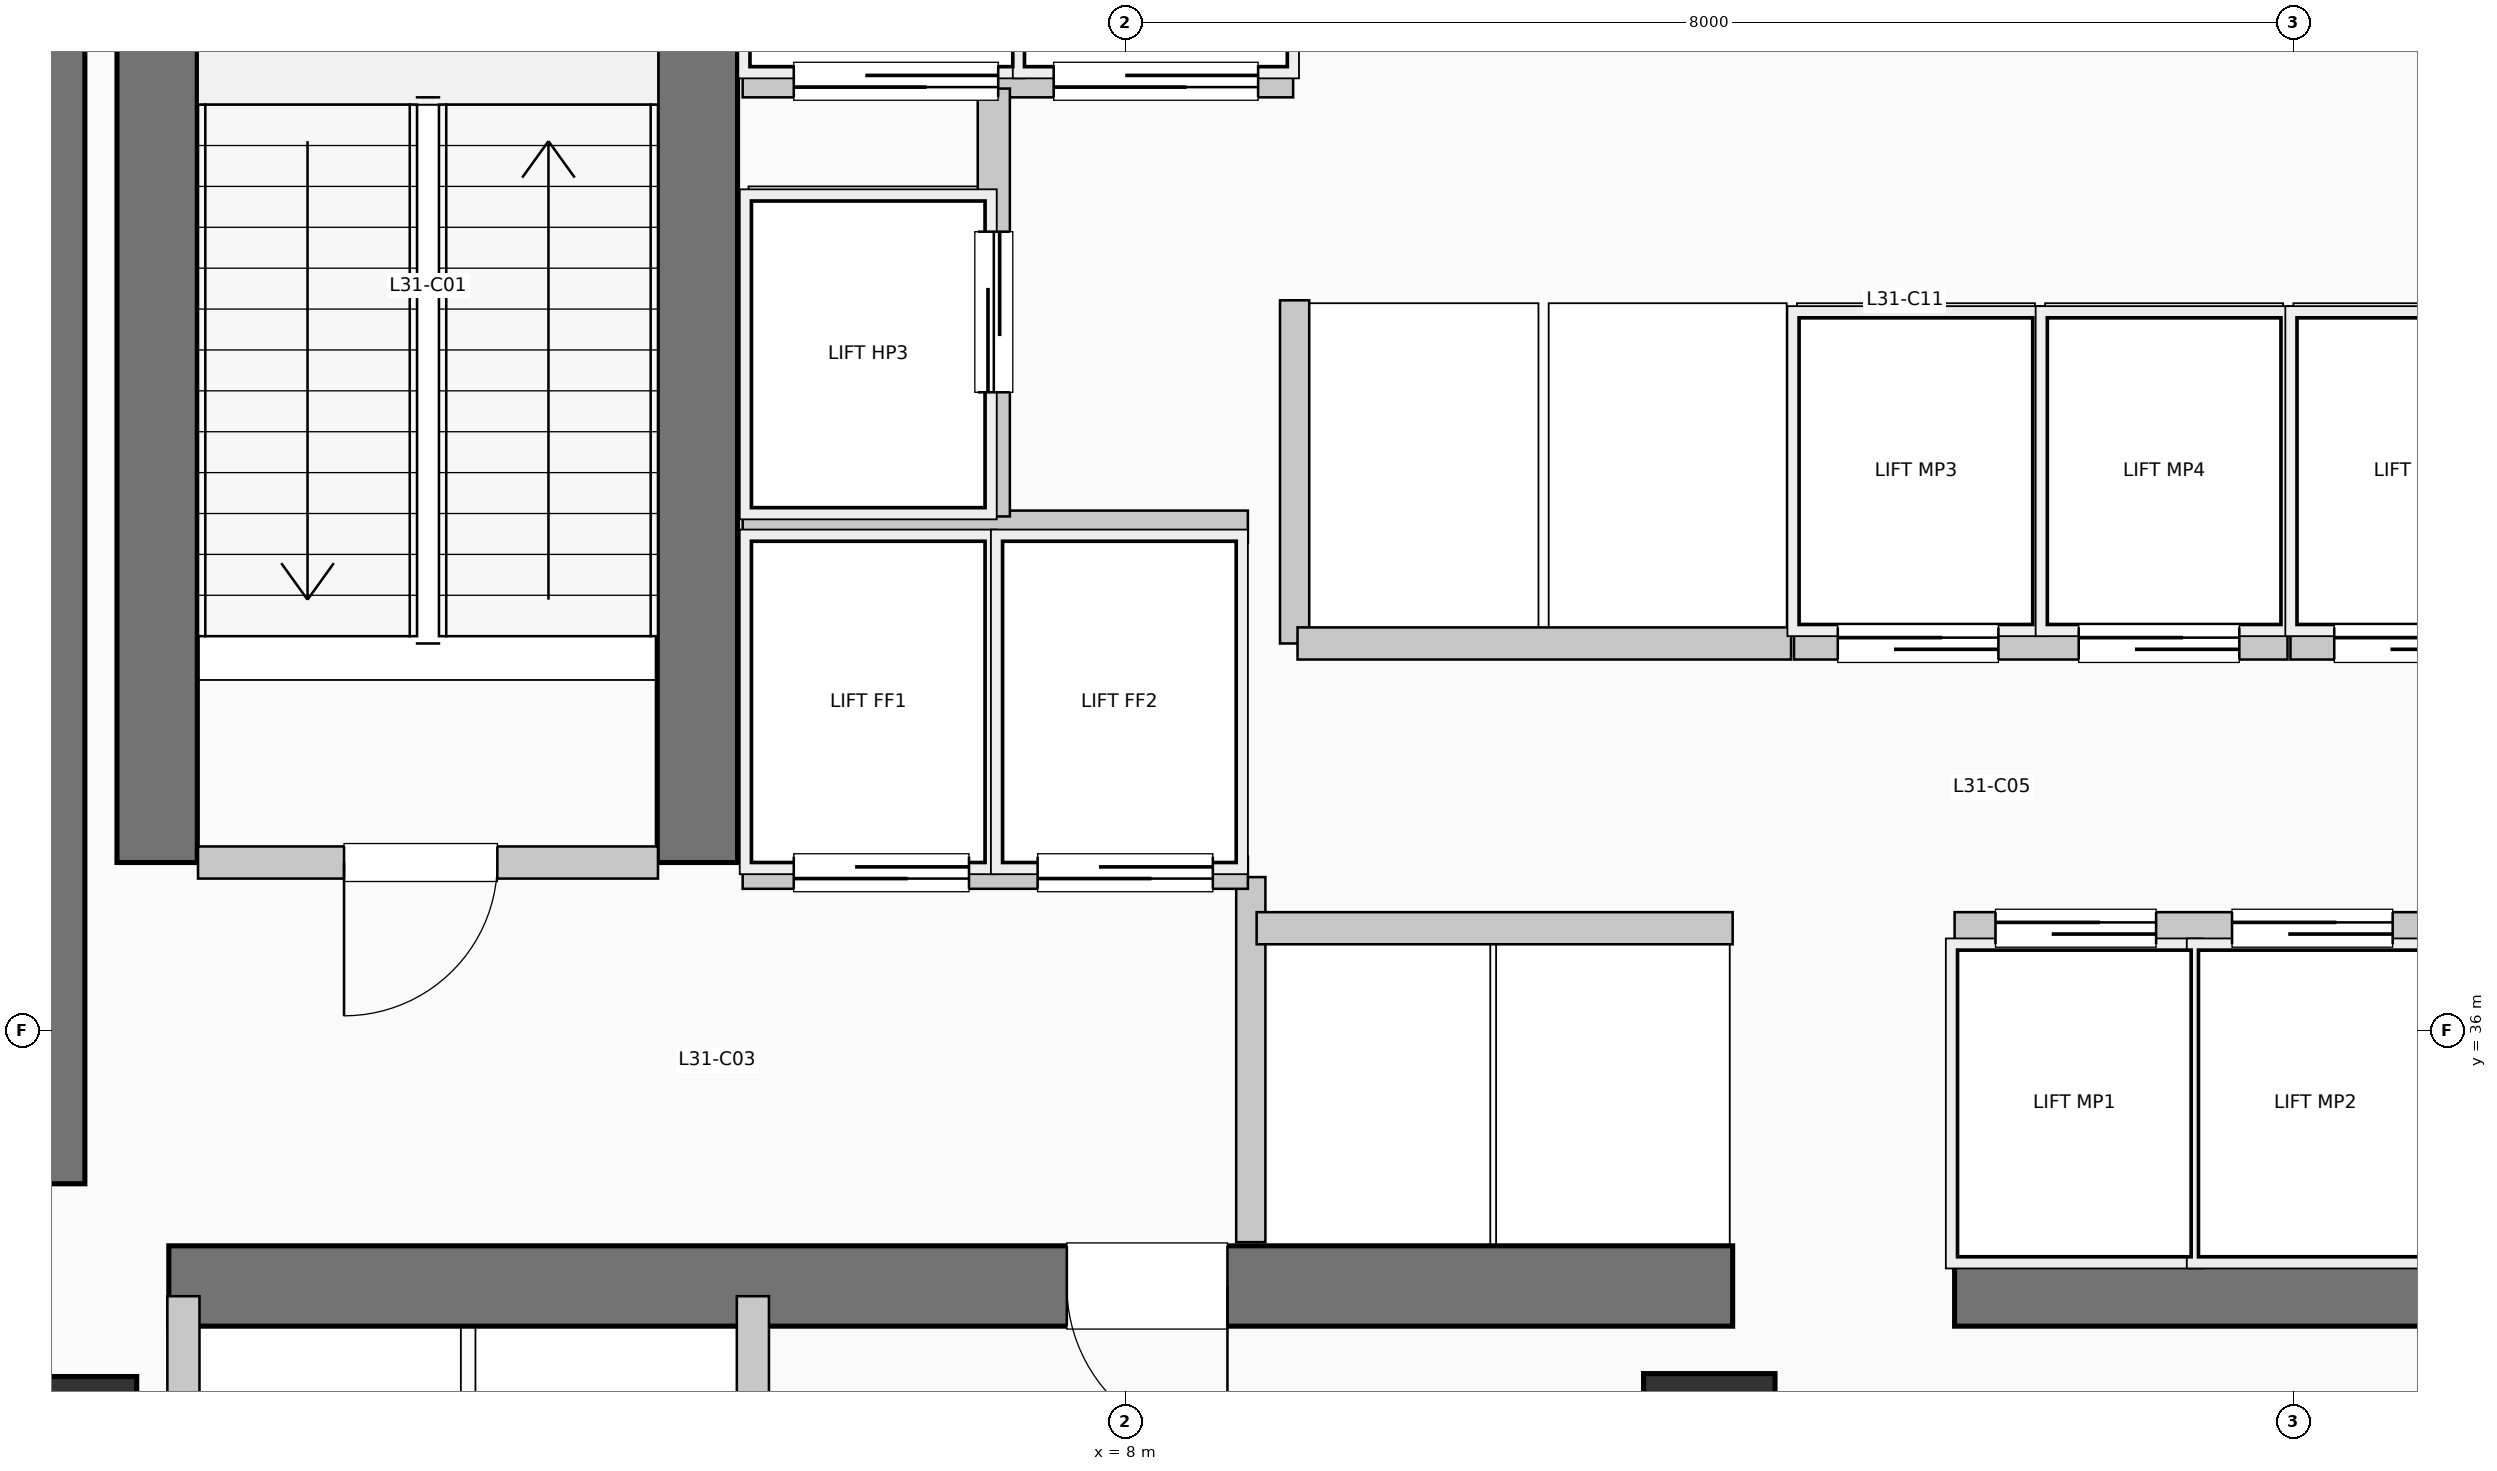
"""IFC4 building model, lengths in metres.
Left out: names, types, materials, properties, quantities, classifications, styles, units other than length and angle.
Written with IfcOpenShell. Run it as: python <this file> out.ifc"""

import sys

from ifc_helpers import new_model, si_unit, direction, frame, frame_2d, origin, origin_2d, place, context, subcontext, project, spatial, rectangle, extrude, element, fill, save


model = new_model("IFC4")
c1 = context("Model", 3, precision=1e-05, world=origin(), true_north=direction((0.0, 1.0)))
c2 = subcontext(c1, "Body", "Model", "MODEL_VIEW")
j1 = project(units=[si_unit("LENGTHUNIT", "METRE"), si_unit("PLANEANGLEUNIT", "RADIAN")], contexts=[c1])
p1 = place(None, origin())
s1 = spatial("IfcSite", under=j1, at=p1, CompositionType="ELEMENT")
p2 = place(p1, origin())
s2 = spatial("IfcBuilding", under=s1, at=p2, CompositionType="ELEMENT")
p3 = place(p2, frame((0.0, 0.0, 130.35)))
s3 = spatial("IfcBuildingStorey", under=s2, at=p3, CompositionType="ELEMENT", Elevation=130.35)
p4 = place(p3, frame((0.5, 34.95, 0.0), z_axis=(0.0, 0.0, 1.0), x_axis=(0.0, 1.0, 0.0)))
e1 = element("IfcWall", 1, at=p4, inside=s3, PredefinedType="SHEAR", context=c2, shape_type="SweptSolid", body=[
    extrude(rectangle(XDim=7.9, YDim=0.75, at=frame_2d((3.95, 0.0))), origin(), (0.0, 0.0, 1.0), 4.62),
])
p5 = place(p3, frame((1.45, 34.25, 0.0), z_axis=(0.0, 0.0, 1.0), x_axis=(1.0, 0.0, 0.0)))
e2 = element("IfcWall", 2, at=p5, inside=s3, PredefinedType="SHEAR", context=c2, shape_type="SweptSolid", body=[
    extrude(rectangle(XDim=10.71, YDim=0.55, at=frame_2d((5.355, 0.0))), origin(), (0.0, 0.0, 1.0), 4.62),
])
p6 = place(p5, frame((7.25, 0.0, 0.0), z_axis=(0.0, 0.0, 1.0), x_axis=(-1.0, 0.0, 0.0)))
e3 = element("IfcOpeningElement", 3, at=p6, cuts=e2, PredefinedType="OPENING", context=c2, shape_type="SweptSolid", body=[
    extrude(rectangle(XDim=1.1, YDim=2.15, at=frame_2d((0.55, 1.075))), frame((0.0, 0.285, 0.0), z_axis=(0.0, -1.0, 0.0), x_axis=(1.0, 0.0, 0.0)), (0.0, 0.0, 1.0), 0.57),
])
p7 = place(p3, frame((13.68, 34.25, 0.0), z_axis=(0.0, 0.0, 1.0), x_axis=(1.0, 0.0, 0.0)))
e4 = element("IfcWall", 4, at=p7, inside=s3, PredefinedType="SHEAR", context=c2, shape_type="SweptSolid", body=[
    extrude(rectangle(XDim=6.12, YDim=0.55, at=frame_2d((3.06, 0.0))), origin(), (0.0, 0.0, 1.0), 4.62),
])
for number, where, z_axis, x_axis in (
    (5, (1.37, 37.15, 0.0), (0.0, 0.0, 1.0), (0.0, 1.0, 0.0)),
    (6, (5.07, 37.15, 0.0), (0.0, 0.0, 1.0), (0.0, 1.0, 0.0)),
):
    element("IfcWall", number, at=place(p3, frame(where, z_axis=z_axis, x_axis=x_axis)), inside=s3, PredefinedType="SHEAR", context=c2, shape_type="SweptSolid", body=[
        extrude(rectangle(XDim=7.89, YDim=0.55, at=frame_2d((3.945, 0.0))), origin(), (0.0, 0.0, 1.0), 4.62),
    ])
p8 = place(p3, frame((0.8, 33.2, 0.0), z_axis=(0.0, 0.0, 1.0), x_axis=(1.0, 0.0, 0.0)))
e7 = element("IfcColumn", 7, at=p8, inside=s3, PredefinedType="COLUMN", context=c2, shape_type="SweptSolid", body=[
    extrude(rectangle(XDim=0.86, YDim=0.86, at=origin_2d()), origin(), (0.0, 0.0, 1.0), 4.62),
])
p9 = place(p3, frame((12.0, 33.2, 0.0), z_axis=(0.0, 0.0, 1.0), x_axis=(1.0, 0.0, 0.0)))
e8 = element("IfcColumn", 8, at=p9, inside=s3, PredefinedType="COLUMN", context=c2, shape_type="SweptSolid", body=[
    extrude(rectangle(XDim=0.9, YDim=0.9, at=origin_2d()), origin(), (0.0, 0.0, 1.0), 4.62),
])
p10 = place(p3, frame((1.65, 37.15, 0.0), z_axis=(0.0, 0.0, 1.0), x_axis=(1.0, 0.0, 0.0)))
e9 = element("IfcWall", 9, at=p10, inside=s3, PredefinedType="PARTITIONING", context=c2, shape_type="SweptSolid", body=[
    extrude(rectangle(XDim=3.15, YDim=0.22, at=frame_2d((1.575, 0.0))), origin(), (0.0, 0.0, 1.0), 4.37),
])
p11 = place(p10, frame((2.05, 0.0, 0.0), z_axis=(0.0, 0.0, 1.0), x_axis=(-1.0, 0.0, 0.0)))
e10 = element("IfcOpeningElement", 10, at=p11, cuts=e9, PredefinedType="OPENING", context=c2, shape_type="SweptSolid", body=[
    extrude(rectangle(XDim=1.05, YDim=2.15, at=frame_2d((0.525, 1.075))), frame((0.0, 0.12, 0.0), z_axis=(0.0, -1.0, 0.0), x_axis=(1.0, 0.0, 0.0)), (0.0, 0.0, 1.0), 0.24),
])
p12 = place(p3, frame((8.86, 34.55, 0.0), z_axis=(0.0, 0.0, 1.0), x_axis=(0.0, 1.0, 0.0)))
e11 = element("IfcWall", 11, at=p12, inside=s3, PredefinedType="PARTITIONING", context=c2, shape_type="SweptSolid", body=[
    extrude(rectangle(XDim=2.5, YDim=0.2, at=frame_2d((1.25, 0.0))), origin(), (0.0, 0.0, 1.0), 4.37),
])
p13 = place(p3, frame((5.38, 37.08, 0.0), z_axis=(0.0, 0.0, 1.0), x_axis=(1.0, 0.0, 0.0)))
e12 = element("IfcWall", 12, at=p13, inside=s3, PredefinedType="PARTITIONING", context=c2, shape_type="SweptSolid", body=[
    extrude(rectangle(XDim=3.46, YDim=0.22, at=frame_2d((1.73, 0.0))), origin(), (0.0, 0.0, 1.0), 4.37),
])
p14 = place(p13, frame((1.55, 0.0, 0.0), z_axis=(0.0, 0.0, 1.0), x_axis=(-1.0, 0.0, 0.0)))
e13 = element("IfcOpeningElement", 13, at=p14, cuts=e12, PredefinedType="OPENING", context=c2, shape_type="SweptSolid", body=[
    extrude(rectangle(XDim=1.2, YDim=2.2, at=frame_2d((0.6, 1.1))), frame((0.0, 0.12, 0.0), z_axis=(0.0, -1.0, 0.0), x_axis=(1.0, 0.0, 0.0)), (0.0, 0.0, 1.0), 0.24),
])
p15 = place(p13, frame((3.22, 0.0, 0.0), z_axis=(0.0, 0.0, 1.0), x_axis=(-1.0, 0.0, 0.0)))
e14 = element("IfcOpeningElement", 14, at=p15, cuts=e12, PredefinedType="OPENING", context=c2, shape_type="SweptSolid", body=[
    extrude(rectangle(XDim=1.2, YDim=2.2, at=frame_2d((0.6, 1.1))), frame((0.0, 0.12, 0.0), z_axis=(0.0, -1.0, 0.0), x_axis=(1.0, 0.0, 0.0)), (0.0, 0.0, 1.0), 0.24),
])
p16 = place(p3, frame((5.38, 39.45, 0.0), z_axis=(0.0, 0.0, 1.0), x_axis=(1.0, 0.0, 0.0)))
e15 = element("IfcWall", 15, at=p16, inside=s3, PredefinedType="PARTITIONING", context=c2, shape_type="SweptSolid", body=[
    extrude(rectangle(XDim=3.46, YDim=0.22, at=frame_2d((1.73, 0.0))), origin(), (0.0, 0.0, 1.0), 4.37),
])
p17 = place(p3, frame((5.38, 42.5, 0.0), z_axis=(0.0, 0.0, 1.0), x_axis=(1.0, 0.0, 0.0)))
e16 = element("IfcWall", 16, at=p17, inside=s3, PredefinedType="PARTITIONING", context=c2, shape_type="SweptSolid", body=[
    extrude(rectangle(XDim=3.77, YDim=0.22, at=frame_2d((1.885, 0.0))), origin(), (0.0, 0.0, 1.0), 4.37),
])
p18 = place(p17, frame((1.75, 0.0, 0.0), z_axis=(0.0, 0.0, 1.0), x_axis=(-1.0, 0.0, 0.0)))
e17 = element("IfcOpeningElement", 17, at=p18, cuts=e16, PredefinedType="OPENING", context=c2, shape_type="SweptSolid", body=[
    extrude(rectangle(XDim=1.4, YDim=2.2, at=frame_2d((0.7, 1.1))), frame((0.0, 0.12, 0.0), z_axis=(0.0, -1.0, 0.0), x_axis=(1.0, 0.0, 0.0)), (0.0, 0.0, 1.0), 0.24),
])
p19 = place(p17, frame((3.53, 0.0, 0.0), z_axis=(0.0, 0.0, 1.0), x_axis=(-1.0, 0.0, 0.0)))
e18 = element("IfcOpeningElement", 18, at=p19, cuts=e16, PredefinedType="OPENING", context=c2, shape_type="SweptSolid", body=[
    extrude(rectangle(XDim=1.4, YDim=2.2, at=frame_2d((0.7, 1.1))), frame((0.0, 0.12, 0.0), z_axis=(0.0, -1.0, 0.0), x_axis=(1.0, 0.0, 0.0)), (0.0, 0.0, 1.0), 0.24),
])
p20 = place(p3, frame((7.1, 39.52, 0.0), z_axis=(0.0, 0.0, 1.0), x_axis=(0.0, 1.0, 0.0)))
e19 = element("IfcWall", 19, at=p20, inside=s3, PredefinedType="PARTITIONING", context=c2, shape_type="SweptSolid", body=[
    extrude(rectangle(XDim=2.93, YDim=0.22, at=frame_2d((1.465, 0.0))), origin(), (0.0, 0.0, 1.0), 4.37),
])
p21 = place(p20, frame((0.85, 0.0, 0.0)))
e20 = element("IfcOpeningElement", 20, at=p21, cuts=e19, PredefinedType="OPENING", context=c2, shape_type="SweptSolid", body=[
    extrude(rectangle(XDim=1.1, YDim=2.2, at=frame_2d((0.55, 1.1))), frame((0.0, 0.12, 0.0), z_axis=(0.0, -1.0, 0.0), x_axis=(1.0, 0.0, 0.0)), (0.0, 0.0, 1.0), 0.24),
])
for number, where, z_axis, x_axis in (
    (21, (1.55, 31.8, 0.0), (0.0, 0.0, 1.0), (0.0, 1.0, 0.0)),
    (22, (5.45, 31.8, 0.0), (0.0, 0.0, 1.0), (0.0, 1.0, 0.0)),
):
    element("IfcWall", number, at=place(p3, frame(where, z_axis=z_axis, x_axis=x_axis)), inside=s3, PredefinedType="PARTITIONING", context=c2, shape_type="SweptSolid", body=[
        extrude(rectangle(XDim=2.38, YDim=0.22, at=frame_2d((1.19, 0.0))), origin(), (0.0, 0.0, 1.0), 4.37),
    ])
p22 = place(p3, frame((9.16, 38.65, 0.0), z_axis=(0.0, 0.0, 1.0), x_axis=(0.0, 1.0, 0.0)))
e23 = element("IfcWall", 23, at=p22, inside=s3, PredefinedType="PARTITIONING", context=c2, shape_type="SweptSolid", body=[
    extrude(rectangle(XDim=2.35, YDim=0.2, at=frame_2d((1.175, 0.0))), origin(), (0.0, 0.0, 1.0), 4.37),
])
p23 = place(p3, frame((8.9, 36.7, 0.0), z_axis=(0.0, 0.0, 1.0), x_axis=(1.0, 0.0, 0.0)))
e24 = element("IfcWall", 24, at=p23, inside=s3, PredefinedType="PARTITIONING", context=c2, shape_type="SweptSolid", body=[
    extrude(rectangle(XDim=3.26, YDim=0.22, at=frame_2d((1.63, 0.0))), origin(), (0.0, 0.0, 1.0), 4.37),
])
p24 = place(p3, frame((9.18, 38.65, 0.0), z_axis=(0.0, 0.0, 1.0), x_axis=(1.0, 0.0, 0.0)))
e25 = element("IfcWall", 25, at=p24, inside=s3, PredefinedType="PARTITIONING", context=c2, shape_type="SweptSolid", body=[
    extrude(rectangle(XDim=3.38, YDim=0.22, at=frame_2d((1.69, 0.0))), origin(), (0.0, 0.0, 1.0), 4.37),
])
p25 = place(p3, frame((13.68, 36.7, 0.0), z_axis=(0.0, 0.0, 1.0), x_axis=(1.0, 0.0, 0.0)))
e26 = element("IfcWall", 26, at=p25, inside=s3, PredefinedType="PARTITIONING", context=c2, shape_type="SweptSolid", body=[
    extrude(rectangle(XDim=3.28, YDim=0.22, at=frame_2d((1.64, 0.0))), origin(), (0.0, 0.0, 1.0), 4.37),
])
p26 = place(p25, frame((0.28, 0.0, 0.0)))
e27 = element("IfcOpeningElement", 27, at=p26, cuts=e26, PredefinedType="OPENING", context=c2, shape_type="SweptSolid", body=[
    extrude(rectangle(XDim=1.1, YDim=2.2, at=frame_2d((0.55, 1.1))), frame((0.0, 0.12, 0.0), z_axis=(0.0, -1.0, 0.0), x_axis=(1.0, 0.0, 0.0)), (0.0, 0.0, 1.0), 0.24),
])
p27 = place(p25, frame((1.9, 0.0, 0.0)))
e28 = element("IfcOpeningElement", 28, at=p27, cuts=e26, PredefinedType="OPENING", context=c2, shape_type="SweptSolid", body=[
    extrude(rectangle(XDim=1.1, YDim=2.2, at=frame_2d((0.55, 1.1))), frame((0.0, 0.12, 0.0), z_axis=(0.0, -1.0, 0.0), x_axis=(1.0, 0.0, 0.0)), (0.0, 0.0, 1.0), 0.24),
])
p28 = place(p3, frame((12.58, 38.65, 0.0), z_axis=(0.0, 0.0, 1.0), x_axis=(1.0, 0.0, 0.0)))
e29 = element("IfcWall", 29, at=p28, inside=s3, PredefinedType="PARTITIONING", context=c2, shape_type="SweptSolid", body=[
    extrude(rectangle(XDim=3.38, YDim=0.22, at=frame_2d((1.69, 0.0))), origin(), (0.0, 0.0, 1.0), 4.37),
])
p29 = place(p28, frame((0.3, 0.0, 0.0)))
e30 = element("IfcOpeningElement", 30, at=p29, cuts=e29, PredefinedType="OPENING", context=c2, shape_type="SweptSolid", body=[
    extrude(rectangle(XDim=1.1, YDim=2.2, at=frame_2d((0.55, 1.1))), frame((0.0, 0.12, 0.0), z_axis=(0.0, -1.0, 0.0), x_axis=(1.0, 0.0, 0.0)), (0.0, 0.0, 1.0), 0.24),
])
p30 = place(p28, frame((1.95, 0.0, 0.0)))
e31 = element("IfcOpeningElement", 31, at=p30, cuts=e29, PredefinedType="OPENING", context=c2, shape_type="SweptSolid", body=[
    extrude(rectangle(XDim=1.1, YDim=2.2, at=frame_2d((0.55, 1.1))), frame((0.0, 0.12, 0.0), z_axis=(0.0, -1.0, 0.0), x_axis=(1.0, 0.0, 0.0)), (0.0, 0.0, 1.0), 0.24),
])
p31 = place(p3, frame((15.98, 38.65, 0.0), z_axis=(0.0, 0.0, 1.0), x_axis=(1.0, 0.0, 0.0)))
e32 = element("IfcWall", 32, at=p31, inside=s3, PredefinedType="PARTITIONING", context=c2, shape_type="SweptSolid", body=[
    extrude(rectangle(XDim=1.72, YDim=0.22, at=frame_2d((0.86, 0.0))), origin(), (0.0, 0.0, 1.0), 4.37),
])
p32 = place(p31, frame((0.3, 0.0, 0.0)))
e33 = element("IfcOpeningElement", 33, at=p32, cuts=e32, PredefinedType="OPENING", context=c2, shape_type="SweptSolid", body=[
    extrude(rectangle(XDim=1.1, YDim=2.2, at=frame_2d((0.55, 1.1))), frame((0.0, 0.12, 0.0), z_axis=(0.0, -1.0, 0.0), x_axis=(1.0, 0.0, 0.0)), (0.0, 0.0, 1.0), 0.24),
])
p33 = place(p11, origin())
e34 = element("IfcDoor", 34, at=p33, inside=s3, OperationType="SINGLE_SWING_LEFT", PredefinedType="DOOR", context=c2, shape_type="SweptSolid", body=[
    extrude(rectangle(XDim=1.05, YDim=2.15, at=frame_2d((0.525, 1.075))), frame((0.0, 0.025, 0.0), z_axis=(0.0, -1.0, 0.0), x_axis=(1.0, 0.0, 0.0)), (0.0, 0.0, 1.0), 0.05),
])
fill(e10, e34)
p34 = place(p6, origin())
e35 = element("IfcDoor", 35, at=p34, inside=s3, OperationType="SINGLE_SWING_RIGHT", PredefinedType="DOOR", context=c2, shape_type="SweptSolid", body=[
    extrude(rectangle(XDim=1.1, YDim=2.15, at=frame_2d((0.55, 1.075))), frame((0.0, 0.025, 0.0), z_axis=(0.0, -1.0, 0.0), x_axis=(1.0, 0.0, 0.0)), (0.0, 0.0, 1.0), 0.05),
])
fill(e3, e35)
p35 = place(p14, origin())
e36 = element("IfcDoor", 36, at=p35, inside=s3, OperationType="SLIDING_TO_RIGHT", PredefinedType="DOOR", context=c2, shape_type="SweptSolid", body=[
    extrude(rectangle(XDim=1.2, YDim=2.2, at=frame_2d((0.6, 1.1))), frame((0.0, 0.025, 0.0), z_axis=(0.0, -1.0, 0.0), x_axis=(1.0, 0.0, 0.0)), (0.0, 0.0, 1.0), 0.05),
])
fill(e13, e36)
p36 = place(p15, origin())
e37 = element("IfcDoor", 37, at=p36, inside=s3, OperationType="SLIDING_TO_RIGHT", PredefinedType="DOOR", context=c2, shape_type="SweptSolid", body=[
    extrude(rectangle(XDim=1.2, YDim=2.2, at=frame_2d((0.6, 1.1))), frame((0.0, 0.025, 0.0), z_axis=(0.0, -1.0, 0.0), x_axis=(1.0, 0.0, 0.0)), (0.0, 0.0, 1.0), 0.05),
])
fill(e14, e37)
p37 = place(p18, origin())
e38 = element("IfcDoor", 38, at=p37, inside=s3, OperationType="SLIDING_TO_LEFT", PredefinedType="DOOR", context=c2, shape_type="SweptSolid", body=[
    extrude(rectangle(XDim=1.4, YDim=2.2, at=frame_2d((0.7, 1.1))), frame((0.0, 0.025, 0.0), z_axis=(0.0, -1.0, 0.0), x_axis=(1.0, 0.0, 0.0)), (0.0, 0.0, 1.0), 0.05),
])
fill(e17, e38)
p38 = place(p19, origin())
e39 = element("IfcDoor", 39, at=p38, inside=s3, OperationType="SLIDING_TO_LEFT", PredefinedType="DOOR", context=c2, shape_type="SweptSolid", body=[
    extrude(rectangle(XDim=1.4, YDim=2.2, at=frame_2d((0.7, 1.1))), frame((0.0, 0.025, 0.0), z_axis=(0.0, -1.0, 0.0), x_axis=(1.0, 0.0, 0.0)), (0.0, 0.0, 1.0), 0.05),
])
fill(e18, e39)
p39 = place(p21, origin())
e40 = element("IfcDoor", 40, at=p39, inside=s3, OperationType="SLIDING_TO_LEFT", PredefinedType="DOOR", context=c2, shape_type="SweptSolid", body=[
    extrude(rectangle(XDim=1.1, YDim=2.2, at=frame_2d((0.55, 1.1))), frame((0.0, 0.025, 0.0), z_axis=(0.0, -1.0, 0.0), x_axis=(1.0, 0.0, 0.0)), (0.0, 0.0, 1.0), 0.05),
])
fill(e20, e40)
p40 = place(p26, origin())
e41 = element("IfcDoor", 41, at=p40, inside=s3, OperationType="SLIDING_TO_RIGHT", PredefinedType="DOOR", context=c2, shape_type="SweptSolid", body=[
    extrude(rectangle(XDim=1.1, YDim=2.2, at=frame_2d((0.55, 1.1))), frame((0.0, 0.025, 0.0), z_axis=(0.0, -1.0, 0.0), x_axis=(1.0, 0.0, 0.0)), (0.0, 0.0, 1.0), 0.05),
])
fill(e27, e41)
p41 = place(p27, origin())
e42 = element("IfcDoor", 42, at=p41, inside=s3, OperationType="SLIDING_TO_RIGHT", PredefinedType="DOOR", context=c2, shape_type="SweptSolid", body=[
    extrude(rectangle(XDim=1.1, YDim=2.2, at=frame_2d((0.55, 1.1))), frame((0.0, 0.025, 0.0), z_axis=(0.0, -1.0, 0.0), x_axis=(1.0, 0.0, 0.0)), (0.0, 0.0, 1.0), 0.05),
])
fill(e28, e42)
p42 = place(p29, origin())
e43 = element("IfcDoor", 43, at=p42, inside=s3, OperationType="SLIDING_TO_RIGHT", PredefinedType="DOOR", context=c2, shape_type="SweptSolid", body=[
    extrude(rectangle(XDim=1.1, YDim=2.2, at=frame_2d((0.55, 1.1))), frame((0.0, 0.025, 0.0), z_axis=(0.0, -1.0, 0.0), x_axis=(1.0, 0.0, 0.0)), (0.0, 0.0, 1.0), 0.05),
])
fill(e30, e43)
p43 = place(p30, origin())
e44 = element("IfcDoor", 44, at=p43, inside=s3, OperationType="SLIDING_TO_RIGHT", PredefinedType="DOOR", context=c2, shape_type="SweptSolid", body=[
    extrude(rectangle(XDim=1.1, YDim=2.2, at=frame_2d((0.55, 1.1))), frame((0.0, 0.025, 0.0), z_axis=(0.0, -1.0, 0.0), x_axis=(1.0, 0.0, 0.0)), (0.0, 0.0, 1.0), 0.05),
])
fill(e31, e44)
p44 = place(p32, origin())
e45 = element("IfcDoor", 45, at=p44, inside=s3, OperationType="SLIDING_TO_LEFT", PredefinedType="DOOR", context=c2, shape_type="SweptSolid", body=[
    extrude(rectangle(XDim=1.1, YDim=2.2, at=frame_2d((0.55, 1.1))), frame((0.0, 0.025, 0.0), z_axis=(0.0, -1.0, 0.0), x_axis=(1.0, 0.0, 0.0)), (0.0, 0.0, 1.0), 0.05),
])
fill(e33, e45)
save(model, sys.argv[1])
